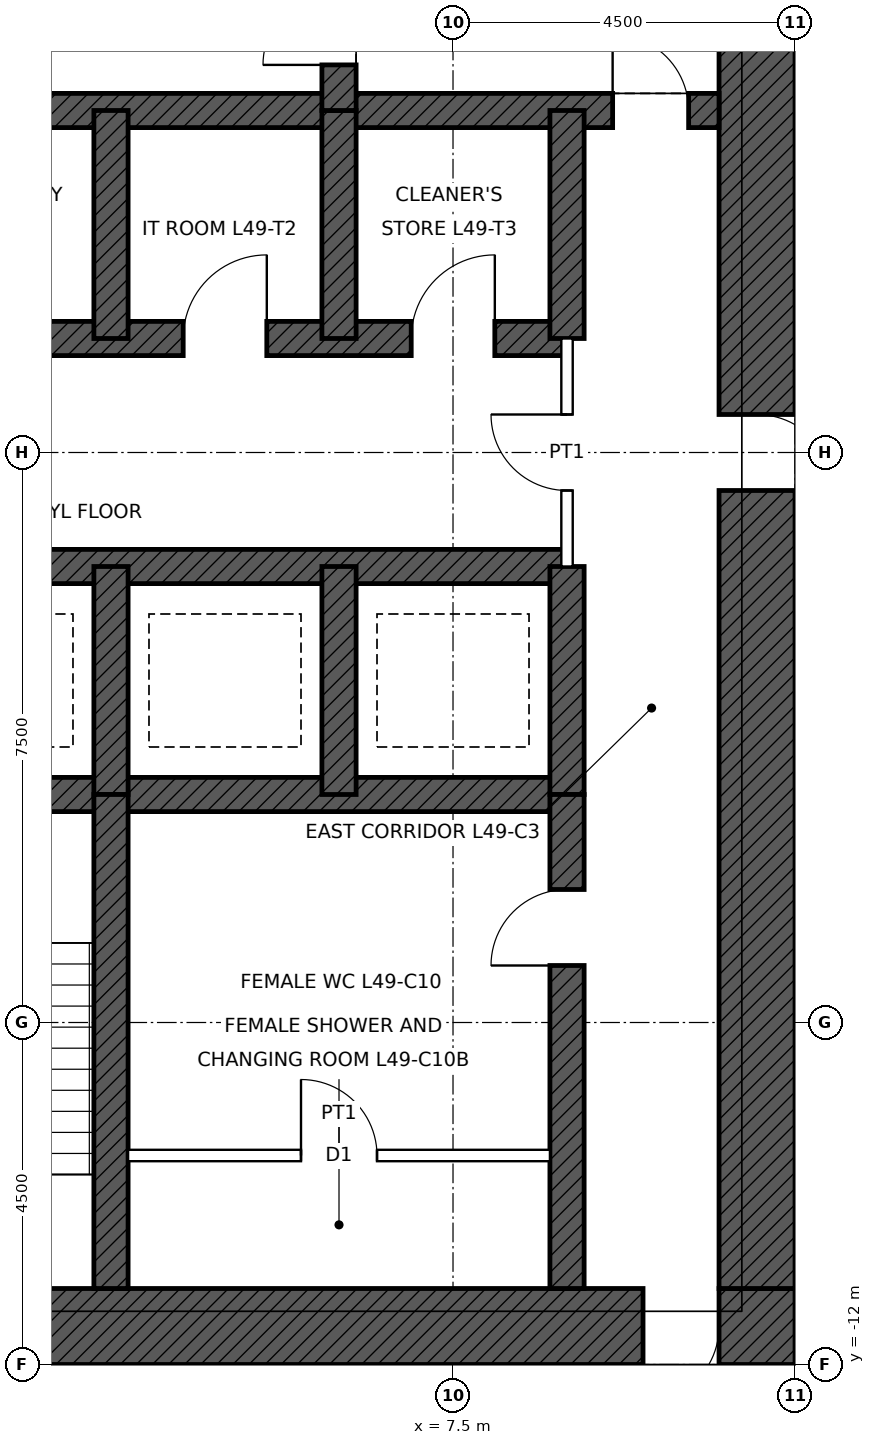
"""IFC4 building model, lengths in metres.
Left out: names, types, materials, properties, quantities, classifications, styles, units other than length and angle.
Written with IfcOpenShell. Run it as: python <this file> out.ifc"""

import sys

from ifc_helpers import new_model, si_unit, direction, frame, frame_2d, origin, place, context, subcontext, project, spatial, rectangle, extrude, element, fill, save


model = new_model("IFC4")
c1 = context("Model", 3, precision=1e-05, world=origin(), true_north=direction((0.0, 1.0)))
c2 = subcontext(c1, "Body", "Model", "MODEL_VIEW")
j1 = project(units=[si_unit("LENGTHUNIT", "METRE"), si_unit("PLANEANGLEUNIT", "RADIAN")], contexts=[c1])
p1 = place(None, origin())
s1 = spatial("IfcSite", under=j1, at=p1, CompositionType="ELEMENT")
p2 = place(p1, origin())
s2 = spatial("IfcBuilding", under=s1, at=p2, CompositionType="ELEMENT")
p3 = place(p2, frame((0.0, 0.0, 229.9)))
s3 = spatial("IfcBuildingStorey", under=s2, at=p3, CompositionType="ELEMENT", Elevation=229.9)
p4 = place(p3, frame((12.0, -11.5, 0.0), z_axis=(0.0, 0.0, 1.0), x_axis=(-1.0, 0.0, 0.0)))
e1 = element("IfcWall", 1, at=p4, inside=s3, PredefinedType="SHEAR", context=c2, shape_type="SweptSolid", body=[
    extrude(rectangle(XDim=24.0, YDim=1.0, at=frame_2d((12.0, 0.0))), origin(), (0.0, 0.0, 1.0), 4.0),
])
p5 = place(p4, frame((11.5, 0.0, 0.0)))
e2 = element("IfcOpeningElement", 2, at=p5, cuts=e1, PredefinedType="OPENING", context=c2, shape_type="SweptSolid", body=[
    extrude(rectangle(XDim=1.0, YDim=2.1, at=frame_2d((0.5, 1.05))), frame((0.0, 0.51, 0.0), z_axis=(0.0, -1.0, 0.0), x_axis=(1.0, 0.0, 0.0)), (0.0, 0.0, 1.0), 1.02),
])
p6 = place(p4, frame((1.0, 0.0, 0.0)))
e3 = element("IfcOpeningElement", 3, at=p6, cuts=e1, PredefinedType="OPENING", context=c2, shape_type="SweptSolid", body=[
    extrude(rectangle(XDim=1.0, YDim=2.4, at=frame_2d((0.5, 1.2))), frame((0.0, 0.51, 0.0), z_axis=(0.0, -1.0, 0.0), x_axis=(1.0, 0.0, 0.0)), (0.0, 0.0, 1.0), 1.02),
])
p7 = place(p3, frame((11.5, 11.0, 0.0), z_axis=(0.0, 0.0, 1.0), x_axis=(0.0, -1.0, 0.0)))
e4 = element("IfcWall", 4, at=p7, inside=s3, PredefinedType="SHEAR", context=c2, shape_type="SweptSolid", body=[
    extrude(rectangle(XDim=22.0, YDim=1.0, at=frame_2d((11.0, 0.0))), origin(), (0.0, 0.0, 1.0), 4.0),
])
p8 = place(p7, frame((10.5, 0.0, 0.0)))
e5 = element("IfcOpeningElement", 5, at=p8, cuts=e4, PredefinedType="OPENING", context=c2, shape_type="SweptSolid", body=[
    extrude(rectangle(XDim=1.0, YDim=2.4, at=frame_2d((0.5, 1.2))), frame((0.0, 0.51, 0.0), z_axis=(0.0, -1.0, 0.0), x_axis=(1.0, 0.0, 0.0)), (0.0, 0.0, 1.0), 1.02),
])
p9 = place(p3, frame((-11.0, 4.5, 0.0), z_axis=(0.0, 0.0, 1.0), x_axis=(1.0, 0.0, 0.0)))
e6 = element("IfcWall", 6, at=p9, inside=s3, PredefinedType="SHEAR", context=c2, shape_type="SweptSolid", body=[
    extrude(rectangle(XDim=22.0, YDim=0.45, at=frame_2d((11.0, 0.0))), origin(), (0.0, 0.0, 1.0), 4.0),
])
p10 = place(p9, frame((0.4, 0.0, 0.0)))
e7 = element("IfcOpeningElement", 7, at=p10, cuts=e6, PredefinedType="OPENING", context=c2, shape_type="SweptSolid", body=[
    extrude(rectangle(XDim=1.0, YDim=2.1, at=frame_2d((0.5, 1.05))), frame((0.0, 0.235, 0.0), z_axis=(0.0, -1.0, 0.0), x_axis=(1.0, 0.0, 0.0)), (0.0, 0.0, 1.0), 0.47),
])
p11 = place(p9, frame((20.6, 0.0, 0.0)))
e8 = element("IfcOpeningElement", 8, at=p11, cuts=e6, PredefinedType="OPENING", context=c2, shape_type="SweptSolid", body=[
    extrude(rectangle(XDim=1.0, YDim=2.1, at=frame_2d((0.5, 1.05))), frame((0.0, 0.235, 0.0), z_axis=(0.0, -1.0, 0.0), x_axis=(1.0, 0.0, 0.0)), (0.0, 0.0, 1.0), 0.47),
])
p12 = place(p3, frame((-9.0, 1.5, 0.0), z_axis=(0.0, 0.0, 1.0), x_axis=(1.0, 0.0, 0.0)))
e9 = element("IfcWall", 9, at=p12, inside=s3, PredefinedType="SHEAR", context=c2, shape_type="SweptSolid", body=[
    extrude(rectangle(XDim=18.0, YDim=0.45, at=frame_2d((9.0, 0.0))), origin(), (0.0, 0.0, 1.0), 4.0),
])
p13 = place(p12, frame((0.95, 0.0, 0.0)))
e10 = element("IfcOpeningElement", 10, at=p13, cuts=e9, PredefinedType="OPENING", context=c2, shape_type="SweptSolid", body=[
    extrude(rectangle(XDim=1.1, YDim=2.1, at=frame_2d((0.55, 1.05))), frame((0.0, 0.235, 0.0), z_axis=(0.0, -1.0, 0.0), x_axis=(1.0, 0.0, 0.0)), (0.0, 0.0, 1.0), 0.47),
])
p14 = place(p12, frame((3.95, 0.0, 0.0)))
e11 = element("IfcOpeningElement", 11, at=p14, cuts=e9, PredefinedType="OPENING", context=c2, shape_type="SweptSolid", body=[
    extrude(rectangle(XDim=1.1, YDim=2.1, at=frame_2d((0.55, 1.05))), frame((0.0, 0.235, 0.0), z_axis=(0.0, -1.0, 0.0), x_axis=(1.0, 0.0, 0.0)), (0.0, 0.0, 1.0), 0.47),
])
p15 = place(p12, frame((6.95, 0.0, 0.0)))
e12 = element("IfcOpeningElement", 12, at=p15, cuts=e9, PredefinedType="OPENING", context=c2, shape_type="SweptSolid", body=[
    extrude(rectangle(XDim=1.1, YDim=2.1, at=frame_2d((0.55, 1.05))), frame((0.0, 0.235, 0.0), z_axis=(0.0, -1.0, 0.0), x_axis=(1.0, 0.0, 0.0)), (0.0, 0.0, 1.0), 0.47),
])
p16 = place(p12, frame((9.95, 0.0, 0.0)))
e13 = element("IfcOpeningElement", 13, at=p16, cuts=e9, PredefinedType="OPENING", context=c2, shape_type="SweptSolid", body=[
    extrude(rectangle(XDim=1.1, YDim=2.1, at=frame_2d((0.55, 1.05))), frame((0.0, 0.235, 0.0), z_axis=(0.0, -1.0, 0.0), x_axis=(1.0, 0.0, 0.0)), (0.0, 0.0, 1.0), 0.47),
])
p17 = place(p12, frame((12.95, 0.0, 0.0)))
e14 = element("IfcOpeningElement", 14, at=p17, cuts=e9, PredefinedType="OPENING", context=c2, shape_type="SweptSolid", body=[
    extrude(rectangle(XDim=1.1, YDim=2.1, at=frame_2d((0.55, 1.05))), frame((0.0, 0.235, 0.0), z_axis=(0.0, -1.0, 0.0), x_axis=(1.0, 0.0, 0.0)), (0.0, 0.0, 1.0), 0.47),
])
p18 = place(p12, frame((15.95, 0.0, 0.0)))
e15 = element("IfcOpeningElement", 15, at=p18, cuts=e9, PredefinedType="OPENING", context=c2, shape_type="SweptSolid", body=[
    extrude(rectangle(XDim=1.1, YDim=2.1, at=frame_2d((0.55, 1.05))), frame((0.0, 0.235, 0.0), z_axis=(0.0, -1.0, 0.0), x_axis=(1.0, 0.0, 0.0)), (0.0, 0.0, 1.0), 0.47),
])
p19 = place(p3, frame((-9.0, -1.5, 0.0), z_axis=(0.0, 0.0, 1.0), x_axis=(1.0, 0.0, 0.0)))
e16 = element("IfcWall", 16, at=p19, inside=s3, PredefinedType="SHEAR", context=c2, shape_type="SweptSolid", body=[
    extrude(rectangle(XDim=18.0, YDim=0.45, at=frame_2d((9.0, 0.0))), origin(), (0.0, 0.0, 1.0), 4.0),
])
p20 = place(p19, frame((0.95, 0.0, 0.0)))
e17 = element("IfcOpeningElement", 17, at=p20, cuts=e16, PredefinedType="OPENING", context=c2, shape_type="SweptSolid", body=[
    extrude(rectangle(XDim=1.1, YDim=2.1, at=frame_2d((0.55, 1.05))), frame((0.0, 0.235, 0.0), z_axis=(0.0, -1.0, 0.0), x_axis=(1.0, 0.0, 0.0)), (0.0, 0.0, 1.0), 0.47),
])
p21 = place(p19, frame((3.95, 0.0, 0.0)))
e18 = element("IfcOpeningElement", 18, at=p21, cuts=e16, PredefinedType="OPENING", context=c2, shape_type="SweptSolid", body=[
    extrude(rectangle(XDim=1.1, YDim=2.1, at=frame_2d((0.55, 1.05))), frame((0.0, 0.235, 0.0), z_axis=(0.0, -1.0, 0.0), x_axis=(1.0, 0.0, 0.0)), (0.0, 0.0, 1.0), 0.47),
])
p22 = place(p19, frame((6.95, 0.0, 0.0)))
e19 = element("IfcOpeningElement", 19, at=p22, cuts=e16, PredefinedType="OPENING", context=c2, shape_type="SweptSolid", body=[
    extrude(rectangle(XDim=1.1, YDim=2.1, at=frame_2d((0.55, 1.05))), frame((0.0, 0.235, 0.0), z_axis=(0.0, -1.0, 0.0), x_axis=(1.0, 0.0, 0.0)), (0.0, 0.0, 1.0), 0.47),
])
p23 = place(p3, frame((-9.0, -4.5, 0.0), z_axis=(0.0, 0.0, 1.0), x_axis=(1.0, 0.0, 0.0)))
e20 = element("IfcWall", 20, at=p23, inside=s3, PredefinedType="SHEAR", context=c2, shape_type="SweptSolid", body=[
    extrude(rectangle(XDim=18.0, YDim=0.45, at=frame_2d((9.0, 0.0))), origin(), (0.0, 0.0, 1.0), 4.0),
])
for number, where, z_axis, x_axis in (
    (21, (9.0, 1.5, 0.0), (0.0, 0.0, 1.0), (0.0, 1.0, 0.0)),
    (22, (9.0, -4.5, 0.0), (0.0, 0.0, 1.0), (0.0, 1.0, 0.0)),
    (23, (3.0, 1.5, 0.0), (0.0, 0.0, 1.0), (0.0, 1.0, 0.0)),
    (24, (6.0, 1.5, 0.0), (0.0, 0.0, 1.0), (0.0, 1.0, 0.0)),
    (25, (3.0, -4.5, 0.0), (0.0, 0.0, 1.0), (0.0, 1.0, 0.0)),
    (26, (6.0, -4.5, 0.0), (0.0, 0.0, 1.0), (0.0, 1.0, 0.0)),
):
    element("IfcWall", number, at=place(p3, frame(where, z_axis=z_axis, x_axis=x_axis)), inside=s3, PredefinedType="SHEAR", context=c2, shape_type="SweptSolid", body=[
        extrude(rectangle(XDim=3.0, YDim=0.45, at=frame_2d((1.5, 0.0))), origin(), (0.0, 0.0, 1.0), 4.0),
    ])
p24 = place(p3, frame((6.0, 4.5, 0.0), z_axis=(0.0, 0.0, 1.0), x_axis=(0.0, 1.0, 0.0)))
e27 = element("IfcWall", 27, at=p24, inside=s3, PredefinedType="SHEAR", context=c2, shape_type="SweptSolid", body=[
    extrude(rectangle(XDim=6.5, YDim=0.45, at=frame_2d((3.25, 0.0))), origin(), (0.0, 0.0, 1.0), 4.0),
])
p25 = place(p24, frame((0.6, 0.0, 0.0)))
e28 = element("IfcOpeningElement", 28, at=p25, cuts=e27, PredefinedType="OPENING", context=c2, shape_type="SweptSolid", body=[
    extrude(rectangle(XDim=1.0, YDim=2.1, at=frame_2d((0.5, 1.05))), frame((0.0, 0.235, 0.0), z_axis=(0.0, -1.0, 0.0), x_axis=(1.0, 0.0, 0.0)), (0.0, 0.0, 1.0), 0.47),
])
p26 = place(p3, frame((9.0, -11.0, 0.0), z_axis=(0.0, 0.0, 1.0), x_axis=(0.0, 1.0, 0.0)))
e29 = element("IfcWall", 29, at=p26, inside=s3, PredefinedType="SHEAR", context=c2, shape_type="SweptSolid", body=[
    extrude(rectangle(XDim=6.5, YDim=0.45, at=frame_2d((3.25, 0.0))), origin(), (0.0, 0.0, 1.0), 4.0),
])
p27 = place(p26, frame((4.25, 0.0, 0.0)))
e30 = element("IfcOpeningElement", 30, at=p27, cuts=e29, PredefinedType="OPENING", context=c2, shape_type="SweptSolid", body=[
    extrude(rectangle(XDim=1.0, YDim=2.1, at=frame_2d((0.5, 1.05))), frame((0.0, 0.235, 0.0), z_axis=(0.0, -1.0, 0.0), x_axis=(1.0, 0.0, 0.0)), (0.0, 0.0, 1.0), 0.47),
])
p28 = place(p3, frame((3.0, -11.0, 0.0), z_axis=(0.0, 0.0, 1.0), x_axis=(0.0, 1.0, 0.0)))
e31 = element("IfcWall", 31, at=p28, inside=s3, PredefinedType="SHEAR", context=c2, shape_type="SweptSolid", body=[
    extrude(rectangle(XDim=6.5, YDim=0.45, at=frame_2d((3.25, 0.0))), origin(), (0.0, 0.0, 1.0), 4.0),
])
p29 = place(p3, frame((3.225, -9.25, 0.0), z_axis=(0.0, 0.0, 1.0), x_axis=(1.0, 0.0, 0.0)))
e32 = element("IfcWall", 32, at=p29, inside=s3, PredefinedType="PARTITIONING", context=c2, shape_type="SweptSolid", body=[
    extrude(rectangle(XDim=5.55, YDim=0.15, at=frame_2d((2.775, 0.0))), origin(), (0.0, 0.0, 1.0), 3.75),
])
p30 = place(p29, frame((2.275, 0.0, 0.0)))
e33 = element("IfcOpeningElement", 33, at=p30, cuts=e32, PredefinedType="OPENING", context=c2, shape_type="SweptSolid", body=[
    extrude(rectangle(XDim=1.0, YDim=2.1, at=frame_2d((0.5, 1.05))), frame((0.0, 0.085, 0.0), z_axis=(0.0, -1.0, 0.0), x_axis=(1.0, 0.0, 0.0)), (0.0, 0.0, 1.0), 0.17),
])
p31 = place(p3, frame((9.0, -1.5, 0.0), z_axis=(0.0, 0.0, 1.0), x_axis=(0.0, 1.0, 0.0)))
e34 = element("IfcWall", 34, at=p31, inside=s3, PredefinedType="PARTITIONING", context=c2, shape_type="SweptSolid", body=[
    extrude(rectangle(XDim=3.0, YDim=0.15, at=frame_2d((1.5, 0.0))), origin(), (0.0, 0.0, 1.0), 3.75),
])
p32 = place(p31, frame((1.0, 0.0, 0.0)))
e35 = element("IfcOpeningElement", 35, at=p32, cuts=e34, PredefinedType="OPENING", context=c2, shape_type="SweptSolid", body=[
    extrude(rectangle(XDim=1.0, YDim=2.4, at=frame_2d((0.5, 1.2))), frame((0.0, 0.085, 0.0), z_axis=(0.0, -1.0, 0.0), x_axis=(1.0, 0.0, 0.0)), (0.0, 0.0, 1.0), 0.17),
])
p33 = place(p11, origin())
e36 = element("IfcDoor", 36, at=p33, inside=s3, OperationType="SINGLE_SWING_LEFT", PredefinedType="DOOR", context=c2, shape_type="SweptSolid", body=[
    extrude(rectangle(XDim=1.0, YDim=2.1, at=frame_2d((0.5, 1.05))), frame((0.0, 0.025, 0.0), z_axis=(0.0, -1.0, 0.0), x_axis=(1.0, 0.0, 0.0)), (0.0, 0.0, 1.0), 0.05),
])
fill(e8, e36)
p34 = place(p25, origin())
e37 = element("IfcDoor", 37, at=p34, inside=s3, OperationType="SINGLE_SWING_LEFT", PredefinedType="DOOR", context=c2, shape_type="SweptSolid", body=[
    extrude(rectangle(XDim=1.0, YDim=2.1, at=frame_2d((0.5, 1.05))), frame((0.0, 0.025, 0.0), z_axis=(0.0, -1.0, 0.0), x_axis=(1.0, 0.0, 0.0)), (0.0, 0.0, 1.0), 0.05),
])
fill(e28, e37)
p35 = place(p8, origin())
e38 = element("IfcDoor", 38, at=p35, inside=s3, OperationType="SINGLE_SWING_RIGHT", PredefinedType="DOOR", context=c2, shape_type="SweptSolid", body=[
    extrude(rectangle(XDim=1.0, YDim=2.4, at=frame_2d((0.5, 1.2))), frame((0.0, 0.485, 0.0), z_axis=(0.0, -1.0, 0.0), x_axis=(1.0, 0.0, 0.0)), (0.0, 0.0, 1.0), 0.05),
])
fill(e5, e38)
p36 = place(p6, origin())
e39 = element("IfcDoor", 39, at=p36, inside=s3, OperationType="SINGLE_SWING_RIGHT", PredefinedType="DOOR", context=c2, shape_type="SweptSolid", body=[
    extrude(rectangle(XDim=1.0, YDim=2.4, at=frame_2d((0.5, 1.2))), frame((0.0, 0.485, 0.0), z_axis=(0.0, -1.0, 0.0), x_axis=(1.0, 0.0, 0.0)), (0.0, 0.0, 1.0), 0.05),
])
fill(e3, e39)
p37 = place(p27, origin())
e40 = element("IfcDoor", 40, at=p37, inside=s3, OperationType="SINGLE_SWING_LEFT", PredefinedType="DOOR", context=c2, shape_type="SweptSolid", body=[
    extrude(rectangle(XDim=1.0, YDim=2.1, at=frame_2d((0.5, 1.05))), frame((0.0, 0.025, 0.0), z_axis=(0.0, -1.0, 0.0), x_axis=(1.0, 0.0, 0.0)), (0.0, 0.0, 1.0), 0.05),
])
fill(e30, e40)
p38 = place(p30, origin())
e41 = element("IfcDoor", 41, at=p38, inside=s3, OperationType="SINGLE_SWING_LEFT", PredefinedType="DOOR", context=c2, shape_type="SweptSolid", body=[
    extrude(rectangle(XDim=1.0, YDim=2.1, at=frame_2d((0.5, 1.05))), frame((0.0, 0.025, 0.0), z_axis=(0.0, -1.0, 0.0), x_axis=(1.0, 0.0, 0.0)), (0.0, 0.0, 1.0), 0.05),
])
fill(e33, e41)
p39 = place(p32, origin())
e42 = element("IfcDoor", 42, at=p39, inside=s3, OperationType="SINGLE_SWING_RIGHT", PredefinedType="DOOR", context=c2, shape_type="SweptSolid", body=[
    extrude(rectangle(XDim=1.0, YDim=2.4, at=frame_2d((0.5, 1.2))), frame((0.0, 0.025, 0.0), z_axis=(0.0, -1.0, 0.0), x_axis=(1.0, 0.0, 0.0)), (0.0, 0.0, 1.0), 0.05),
])
fill(e35, e42)
p40 = place(p17, origin())
e43 = element("IfcDoor", 43, at=p40, inside=s3, OperationType="SINGLE_SWING_RIGHT", PredefinedType="DOOR", context=c2, shape_type="SweptSolid", body=[
    extrude(rectangle(XDim=1.1, YDim=2.1, at=frame_2d((0.55, 1.05))), frame((0.0, 0.025, 0.0), z_axis=(0.0, -1.0, 0.0), x_axis=(1.0, 0.0, 0.0)), (0.0, 0.0, 1.0), 0.05),
])
fill(e14, e43)
p41 = place(p18, origin())
e44 = element("IfcDoor", 44, at=p41, inside=s3, OperationType="SINGLE_SWING_RIGHT", PredefinedType="DOOR", context=c2, shape_type="SweptSolid", body=[
    extrude(rectangle(XDim=1.1, YDim=2.1, at=frame_2d((0.55, 1.05))), frame((0.0, 0.025, 0.0), z_axis=(0.0, -1.0, 0.0), x_axis=(1.0, 0.0, 0.0)), (0.0, 0.0, 1.0), 0.05),
])
fill(e15, e44)
save(model, sys.argv[1])
